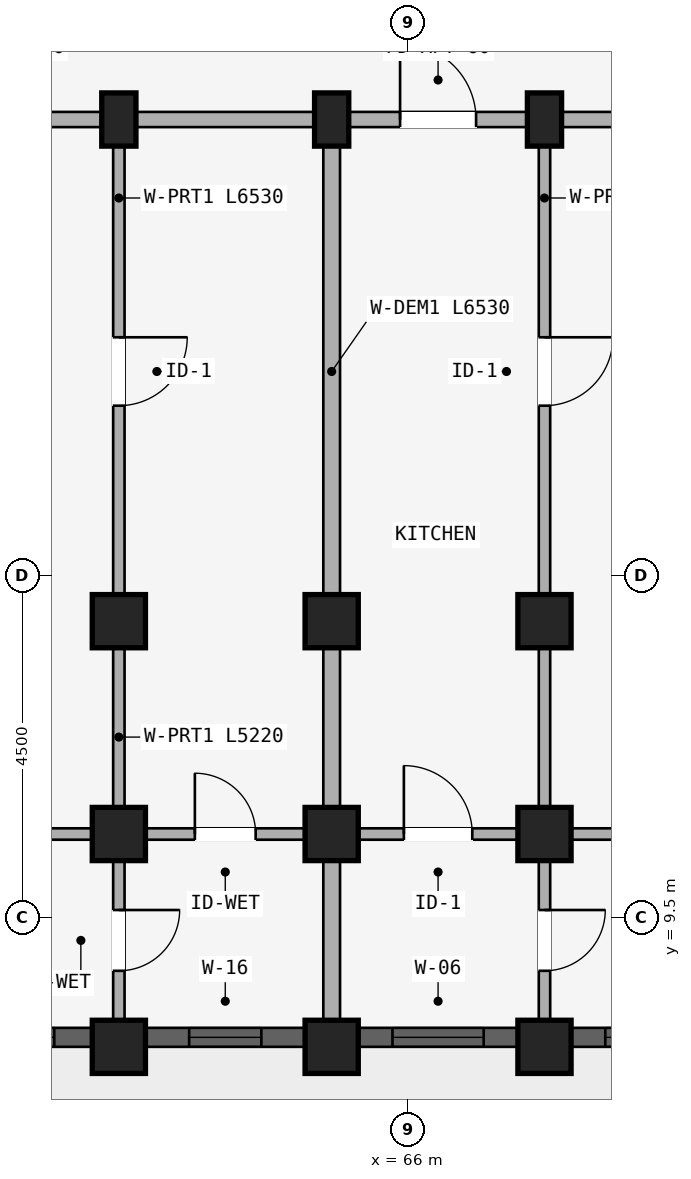
"""IFC4 building model, lengths in metres.
Left out: names, types, materials, properties, quantities, classifications, styles, units other than length and angle.
Written with IfcOpenShell. Run it as: python <this file> out.ifc"""

import sys

from ifc_helpers import new_model, si_unit, direction, frame, frame_2d, origin, origin_2d, place, context, subcontext, project, spatial, rectangle, extrude, element, fill, save


model = new_model("IFC4")
c1 = context("Model", 3, precision=1e-05, world=origin(), true_north=direction((0.0, 1.0)))
c2 = subcontext(c1, "Body", "Model", "MODEL_VIEW")
j1 = project(units=[si_unit("LENGTHUNIT", "METRE"), si_unit("PLANEANGLEUNIT", "RADIAN")], contexts=[c1])
p1 = place(None, origin())
s1 = spatial("IfcSite", under=j1, at=p1, CompositionType="ELEMENT")
p2 = place(p1, origin())
s2 = spatial("IfcBuilding", under=s1, at=p2, CompositionType="ELEMENT")
p3 = place(p2, frame((0.0, 0.0, 24.45)))
s3 = spatial("IfcBuildingStorey", under=s2, at=p3, CompositionType="ELEMENT", Elevation=24.45)
p4 = place(p3, frame((62.2, 20.0, 0.0), z_axis=(0.0, 0.0, 1.0), x_axis=(1.0, 0.0, 0.0)))
e1 = element("IfcColumn", 1, at=p4, inside=s3, PredefinedType="COLUMN", context=c2, shape_type="SweptSolid", body=[
    extrude(rectangle(XDim=0.45, YDim=0.7, at=origin_2d()), origin(), (0.0, 0.0, 1.0), 2.93),
])
for number, where, z_axis, x_axis in (
    (2, (62.2, 13.4, 0.0), (0.0, 0.0, 1.0), (1.0, 0.0, 0.0)),
    (3, (62.2, 10.6, 0.0), (0.0, 0.0, 1.0), (1.0, 0.0, 0.0)),
):
    element("IfcColumn", number, at=place(p3, frame(where, z_axis=z_axis, x_axis=x_axis)), inside=s3, PredefinedType="COLUMN", context=c2, shape_type="SweptSolid", body=[
        extrude(rectangle(XDim=0.7, YDim=0.7, at=origin_2d()), origin(), (0.0, 0.0, 1.0), 2.93),
    ])
p5 = place(p3, frame((62.2, 7.8, 0.0), z_axis=(0.0, 0.0, 1.0), x_axis=(1.0, 0.0, 0.0)))
e4 = element("IfcColumn", 4, at=p5, inside=s3, PredefinedType="COLUMN", context=c2, shape_type="SweptSolid", body=[
    extrude(rectangle(XDim=0.7, YDim=0.7, at=origin_2d()), origin(), (0.0, 0.0, 1.0), 2.97),
])
p6 = place(p3, frame((65.0, 20.0, 0.0), z_axis=(0.0, 0.0, 1.0), x_axis=(1.0, 0.0, 0.0)))
e5 = element("IfcColumn", 5, at=p6, inside=s3, PredefinedType="COLUMN", context=c2, shape_type="SweptSolid", body=[
    extrude(rectangle(XDim=0.45, YDim=0.7, at=origin_2d()), origin(), (0.0, 0.0, 1.0), 2.93),
])
for number, where, z_axis, x_axis in (
    (6, (65.0, 13.4, 0.0), (0.0, 0.0, 1.0), (1.0, 0.0, 0.0)),
    (7, (65.0, 10.6, 0.0), (0.0, 0.0, 1.0), (1.0, 0.0, 0.0)),
):
    element("IfcColumn", number, at=place(p3, frame(where, z_axis=z_axis, x_axis=x_axis)), inside=s3, PredefinedType="COLUMN", context=c2, shape_type="SweptSolid", body=[
        extrude(rectangle(XDim=0.7, YDim=0.7, at=origin_2d()), origin(), (0.0, 0.0, 1.0), 2.93),
    ])
p7 = place(p3, frame((65.0, 7.8, 0.0), z_axis=(0.0, 0.0, 1.0), x_axis=(1.0, 0.0, 0.0)))
e8 = element("IfcColumn", 8, at=p7, inside=s3, PredefinedType="COLUMN", context=c2, shape_type="SweptSolid", body=[
    extrude(rectangle(XDim=0.7, YDim=0.7, at=origin_2d()), origin(), (0.0, 0.0, 1.0), 2.97),
])
p8 = place(p3, frame((67.8, 20.0, 0.0), z_axis=(0.0, 0.0, 1.0), x_axis=(1.0, 0.0, 0.0)))
e9 = element("IfcColumn", 9, at=p8, inside=s3, PredefinedType="COLUMN", context=c2, shape_type="SweptSolid", body=[
    extrude(rectangle(XDim=0.45, YDim=0.7, at=origin_2d()), origin(), (0.0, 0.0, 1.0), 2.93),
])
for number, where, z_axis, x_axis in (
    (10, (67.8, 13.4, 0.0), (0.0, 0.0, 1.0), (1.0, 0.0, 0.0)),
    (11, (67.8, 10.6, 0.0), (0.0, 0.0, 1.0), (1.0, 0.0, 0.0)),
):
    element("IfcColumn", number, at=place(p3, frame(where, z_axis=z_axis, x_axis=x_axis)), inside=s3, PredefinedType="COLUMN", context=c2, shape_type="SweptSolid", body=[
        extrude(rectangle(XDim=0.7, YDim=0.7, at=origin_2d()), origin(), (0.0, 0.0, 1.0), 2.93),
    ])
p9 = place(p3, frame((67.8, 7.8, 0.0), z_axis=(0.0, 0.0, 1.0), x_axis=(1.0, 0.0, 0.0)))
e12 = element("IfcColumn", 12, at=p9, inside=s3, PredefinedType="COLUMN", context=c2, shape_type="SweptSolid", body=[
    extrude(rectangle(XDim=0.7, YDim=0.7, at=origin_2d()), origin(), (0.0, 0.0, 1.0), 2.97),
])
p10 = place(p3, frame((59.4, 20.0, 0.0), z_axis=(0.0, 0.0, 1.0), x_axis=(1.0, 0.0, 0.0)))
e13 = element("IfcWall", 13, at=p10, inside=s3, PredefinedType="STANDARD", context=c2, shape_type="SweptSolid", body=[
    extrude(rectangle(XDim=2.8, YDim=0.2, at=frame_2d((1.4, 0.0))), origin(), (0.0, 0.0, 1.0), 2.372),
])
p11 = place(p10, frame((0.9, 0.0, 0.0)))
e14 = element("IfcOpeningElement", 14, at=p11, cuts=e13, PredefinedType="OPENING", context=c2, shape_type="SweptSolid", body=[
    extrude(rectangle(XDim=1.0, YDim=2.15, at=frame_2d((0.5, 1.075))), frame((0.0, 0.11, 0.0), z_axis=(0.0, -1.0, 0.0), x_axis=(1.0, 0.0, 0.0)), (0.0, 0.0, 1.0), 0.22),
])
p12 = place(p3, frame((59.48, 10.6, 0.0), z_axis=(0.0, 0.0, 1.0), x_axis=(1.0, 0.0, 0.0)))
e15 = element("IfcWall", 15, at=p12, inside=s3, PredefinedType="PLUMBINGWALL", context=c2, shape_type="SweptSolid", body=[
    extrude(rectangle(XDim=2.64, YDim=0.15, at=frame_2d((1.32, 0.0))), origin(), (0.0, 0.0, 1.0), 2.372),
])
p13 = place(p12, frame((0.87, 0.0, 0.0)))
e16 = element("IfcOpeningElement", 16, at=p13, cuts=e15, PredefinedType="OPENING", context=c2, shape_type="SweptSolid", body=[
    extrude(rectangle(XDim=0.9, YDim=2.1, at=frame_2d((0.45, 1.05))), frame((0.0, 0.085, 0.0), z_axis=(0.0, -1.0, 0.0), x_axis=(1.0, 0.0, 0.0)), (0.0, 0.0, 1.0), 0.17),
])
p14 = place(p3, frame((62.2, 20.0, 0.0), z_axis=(0.0, 0.0, 1.0), x_axis=(1.0, 0.0, 0.0)))
e17 = element("IfcWall", 17, at=p14, inside=s3, PredefinedType="STANDARD", context=c2, shape_type="SweptSolid", body=[
    extrude(rectangle(XDim=2.8, YDim=0.2, at=frame_2d((1.4, 0.0))), origin(), (0.0, 0.0, 1.0), 2.372),
])
p15 = place(p3, frame((62.28, 10.6, 0.0), z_axis=(0.0, 0.0, 1.0), x_axis=(1.0, 0.0, 0.0)))
e18 = element("IfcWall", 18, at=p15, inside=s3, PredefinedType="PLUMBINGWALL", context=c2, shape_type="SweptSolid", body=[
    extrude(rectangle(XDim=2.64, YDim=0.15, at=frame_2d((1.32, 0.0))), origin(), (0.0, 0.0, 1.0), 2.372),
])
p16 = place(p15, frame((0.92, 0.0, 0.0)))
e19 = element("IfcOpeningElement", 19, at=p16, cuts=e18, PredefinedType="OPENING", context=c2, shape_type="SweptSolid", body=[
    extrude(rectangle(XDim=0.8, YDim=2.1, at=frame_2d((0.4, 1.05))), frame((0.0, 0.085, 0.0), z_axis=(0.0, -1.0, 0.0), x_axis=(1.0, 0.0, 0.0)), (0.0, 0.0, 1.0), 0.17),
])
p17 = place(p3, frame((65.0, 20.0, 0.0), z_axis=(0.0, 0.0, 1.0), x_axis=(1.0, 0.0, 0.0)))
e20 = element("IfcWall", 20, at=p17, inside=s3, PredefinedType="STANDARD", context=c2, shape_type="SweptSolid", body=[
    extrude(rectangle(XDim=2.8, YDim=0.2, at=frame_2d((1.4, 0.0))), origin(), (0.0, 0.0, 1.0), 2.372),
])
p18 = place(p17, frame((0.9, 0.0, 0.0)))
e21 = element("IfcOpeningElement", 21, at=p18, cuts=e20, PredefinedType="OPENING", context=c2, shape_type="SweptSolid", body=[
    extrude(rectangle(XDim=1.0, YDim=2.15, at=frame_2d((0.5, 1.075))), frame((0.0, 0.11, 0.0), z_axis=(0.0, -1.0, 0.0), x_axis=(1.0, 0.0, 0.0)), (0.0, 0.0, 1.0), 0.22),
])
p19 = place(p3, frame((65.08, 10.6, 0.0), z_axis=(0.0, 0.0, 1.0), x_axis=(1.0, 0.0, 0.0)))
e22 = element("IfcWall", 22, at=p19, inside=s3, PredefinedType="PLUMBINGWALL", context=c2, shape_type="SweptSolid", body=[
    extrude(rectangle(XDim=2.64, YDim=0.15, at=frame_2d((1.32, 0.0))), origin(), (0.0, 0.0, 1.0), 2.372),
])
p20 = place(p19, frame((0.87, 0.0, 0.0)))
e23 = element("IfcOpeningElement", 23, at=p20, cuts=e22, PredefinedType="OPENING", context=c2, shape_type="SweptSolid", body=[
    extrude(rectangle(XDim=0.9, YDim=2.1, at=frame_2d((0.45, 1.05))), frame((0.0, 0.085, 0.0), z_axis=(0.0, -1.0, 0.0), x_axis=(1.0, 0.0, 0.0)), (0.0, 0.0, 1.0), 0.17),
])
p21 = place(p3, frame((67.8, 20.0, 0.0), z_axis=(0.0, 0.0, 1.0), x_axis=(1.0, 0.0, 0.0)))
e24 = element("IfcWall", 24, at=p21, inside=s3, PredefinedType="STANDARD", context=c2, shape_type="SweptSolid", body=[
    extrude(rectangle(XDim=2.8, YDim=0.2, at=frame_2d((1.4, 0.0))), origin(), (0.0, 0.0, 1.0), 2.372),
])
p22 = place(p3, frame((67.88, 10.6, 0.0), z_axis=(0.0, 0.0, 1.0), x_axis=(1.0, 0.0, 0.0)))
e25 = element("IfcWall", 25, at=p22, inside=s3, PredefinedType="PLUMBINGWALL", context=c2, shape_type="SweptSolid", body=[
    extrude(rectangle(XDim=2.64, YDim=0.15, at=frame_2d((1.32, 0.0))), origin(), (0.0, 0.0, 1.0), 2.372),
])
p23 = place(p22, frame((0.92, 0.0, 0.0)))
e26 = element("IfcOpeningElement", 26, at=p23, cuts=e25, PredefinedType="OPENING", context=c2, shape_type="SweptSolid", body=[
    extrude(rectangle(XDim=0.8, YDim=2.1, at=frame_2d((0.4, 1.05))), frame((0.0, 0.085, 0.0), z_axis=(0.0, -1.0, 0.0), x_axis=(1.0, 0.0, 0.0)), (0.0, 0.0, 1.0), 0.17),
])
p24 = place(p3, frame((62.2, 19.95, 0.0), z_axis=(0.0, 0.0, 1.0), x_axis=(0.0, -1.0, 0.0)))
e27 = element("IfcWall", 27, at=p24, inside=s3, PredefinedType="PARTITIONING", context=c2, shape_type="SweptSolid", body=[
    extrude(rectangle(XDim=6.53, YDim=0.15, at=frame_2d((3.265, 0.0))), origin(), (0.0, 0.0, 1.0), 2.372),
])
p25 = place(p24, frame((2.815, 0.0, 0.0)))
e28 = element("IfcOpeningElement", 28, at=p25, cuts=e27, PredefinedType="OPENING", context=c2, shape_type="SweptSolid", body=[
    extrude(rectangle(XDim=0.9, YDim=2.1, at=frame_2d((0.45, 1.05))), frame((0.0, 0.085, 0.0), z_axis=(0.0, -1.0, 0.0), x_axis=(1.0, 0.0, 0.0)), (0.0, 0.0, 1.0), 0.17),
])
p26 = place(p3, frame((62.2, 13.3, 0.0), z_axis=(0.0, 0.0, 1.0), x_axis=(0.0, -1.0, 0.0)))
e29 = element("IfcWall", 29, at=p26, inside=s3, PredefinedType="PARTITIONING", context=c2, shape_type="SweptSolid", body=[
    extrude(rectangle(XDim=5.22, YDim=0.15, at=frame_2d((2.61, 0.0))), origin(), (0.0, 0.0, 1.0), 2.372),
])
p27 = place(p26, frame((3.7, 0.0, 0.0)))
e30 = element("IfcOpeningElement", 30, at=p27, cuts=e29, PredefinedType="OPENING", context=c2, shape_type="SweptSolid", body=[
    extrude(rectangle(XDim=0.8, YDim=2.1, at=frame_2d((0.4, 1.05))), frame((0.0, 0.085, 0.0), z_axis=(0.0, -1.0, 0.0), x_axis=(1.0, 0.0, 0.0)), (0.0, 0.0, 1.0), 0.17),
])
p28 = place(p3, frame((65.0, 19.95, 0.0), z_axis=(0.0, 0.0, 1.0), x_axis=(0.0, -1.0, 0.0)))
e31 = element("IfcWall", 31, at=p28, inside=s3, PredefinedType="STANDARD", context=c2, shape_type="SweptSolid", body=[
    extrude(rectangle(XDim=6.53, YDim=0.22, at=frame_2d((3.265, 0.0))), origin(), (0.0, 0.0, 1.0), 2.372),
])
p29 = place(p3, frame((65.0, 13.3, 0.0), z_axis=(0.0, 0.0, 1.0), x_axis=(0.0, -1.0, 0.0)))
e32 = element("IfcWall", 32, at=p29, inside=s3, PredefinedType="STANDARD", context=c2, shape_type="SweptSolid", body=[
    extrude(rectangle(XDim=5.22, YDim=0.22, at=frame_2d((2.61, 0.0))), origin(), (0.0, 0.0, 1.0), 2.372),
])
p30 = place(p3, frame((67.8, 19.95, 0.0), z_axis=(0.0, 0.0, 1.0), x_axis=(0.0, -1.0, 0.0)))
e33 = element("IfcWall", 33, at=p30, inside=s3, PredefinedType="PARTITIONING", context=c2, shape_type="SweptSolid", body=[
    extrude(rectangle(XDim=6.53, YDim=0.15, at=frame_2d((3.265, 0.0))), origin(), (0.0, 0.0, 1.0), 2.372),
])
p31 = place(p30, frame((2.815, 0.0, 0.0)))
e34 = element("IfcOpeningElement", 34, at=p31, cuts=e33, PredefinedType="OPENING", context=c2, shape_type="SweptSolid", body=[
    extrude(rectangle(XDim=0.9, YDim=2.1, at=frame_2d((0.45, 1.05))), frame((0.0, 0.085, 0.0), z_axis=(0.0, -1.0, 0.0), x_axis=(1.0, 0.0, 0.0)), (0.0, 0.0, 1.0), 0.17),
])
p32 = place(p3, frame((67.8, 13.3, 0.0), z_axis=(0.0, 0.0, 1.0), x_axis=(0.0, -1.0, 0.0)))
e35 = element("IfcWall", 35, at=p32, inside=s3, PredefinedType="PARTITIONING", context=c2, shape_type="SweptSolid", body=[
    extrude(rectangle(XDim=5.22, YDim=0.15, at=frame_2d((2.61, 0.0))), origin(), (0.0, 0.0, 1.0), 2.372),
])
p33 = place(p32, frame((3.7, 0.0, 0.0)))
e36 = element("IfcOpeningElement", 36, at=p33, cuts=e35, PredefinedType="OPENING", context=c2, shape_type="SweptSolid", body=[
    extrude(rectangle(XDim=0.8, YDim=2.1, at=frame_2d((0.4, 1.05))), frame((0.0, 0.085, 0.0), z_axis=(0.0, -1.0, 0.0), x_axis=(1.0, 0.0, 0.0)), (0.0, 0.0, 1.0), 0.17),
])
p34 = place(p3, frame((59.753, 7.925, 0.0), z_axis=(0.0, 0.0, 1.0), x_axis=(1.0, 0.0, 0.0)))
e37 = element("IfcWall", 37, at=p34, inside=s3, PredefinedType="STANDARD", context=c2, shape_type="SweptSolid", body=[
    extrude(rectangle(XDim=2.093, YDim=0.25, at=frame_2d((1.046, 0.0))), origin(), (0.0, 0.0, 1.0), 2.48),
])
p35 = place(p34, frame((0.497, 0.0, 0.83)))
e38 = element("IfcOpeningElement", 38, at=p35, cuts=e37, PredefinedType="OPENING", context=c2, shape_type="SweptSolid", body=[
    extrude(rectangle(XDim=1.1, YDim=1.45, at=frame_2d((0.55, 0.725))), frame((0.0, 0.135, 0.0), z_axis=(0.0, -1.0, 0.0), x_axis=(1.0, 0.0, 0.0)), (0.0, 0.0, 1.0), 0.27),
])
p36 = place(p3, frame((62.553, 7.925, 0.0), z_axis=(0.0, 0.0, 1.0), x_axis=(1.0, 0.0, 0.0)))
e39 = element("IfcWall", 39, at=p36, inside=s3, PredefinedType="STANDARD", context=c2, shape_type="SweptSolid", body=[
    extrude(rectangle(XDim=2.093, YDim=0.25, at=frame_2d((1.046, 0.0))), origin(), (0.0, 0.0, 1.0), 2.48),
])
p37 = place(p36, frame((0.572, 0.0, 0.88)))
e40 = element("IfcOpeningElement", 40, at=p37, cuts=e39, PredefinedType="OPENING", context=c2, shape_type="SweptSolid", body=[
    extrude(rectangle(XDim=0.95, YDim=1.35, at=frame_2d((0.475, 0.675))), frame((0.0, 0.135, 0.0), z_axis=(0.0, -1.0, 0.0), x_axis=(1.0, 0.0, 0.0)), (0.0, 0.0, 1.0), 0.27),
])
p38 = place(p3, frame((65.354, 7.925, 0.0), z_axis=(0.0, 0.0, 1.0), x_axis=(1.0, 0.0, 0.0)))
e41 = element("IfcWall", 41, at=p38, inside=s3, PredefinedType="STANDARD", context=c2, shape_type="SweptSolid", body=[
    extrude(rectangle(XDim=2.093, YDim=0.25, at=frame_2d((1.046, 0.0))), origin(), (0.0, 0.0, 1.0), 2.48),
])
p39 = place(p38, frame((0.447, 0.0, 0.78)))
e42 = element("IfcOpeningElement", 42, at=p39, cuts=e41, PredefinedType="OPENING", context=c2, shape_type="SweptSolid", body=[
    extrude(rectangle(XDim=1.2, YDim=1.5, at=frame_2d((0.6, 0.75))), frame((0.0, 0.135, 0.0), z_axis=(0.0, -1.0, 0.0), x_axis=(1.0, 0.0, 0.0)), (0.0, 0.0, 1.0), 0.27),
])
p40 = place(p3, frame((68.154, 7.925, 0.0), z_axis=(0.0, 0.0, 1.0), x_axis=(1.0, 0.0, 0.0)))
e43 = element("IfcWall", 43, at=p40, inside=s3, PredefinedType="STANDARD", context=c2, shape_type="SweptSolid", body=[
    extrude(rectangle(XDim=2.093, YDim=0.25, at=frame_2d((1.046, 0.0))), origin(), (0.0, 0.0, 1.0), 2.48),
])
p41 = place(p40, frame((0.447, 0.0, 0.78)))
e44 = element("IfcOpeningElement", 44, at=p41, cuts=e43, PredefinedType="OPENING", context=c2, shape_type="SweptSolid", body=[
    extrude(rectangle(XDim=1.2, YDim=1.5, at=frame_2d((0.6, 0.75))), frame((0.0, 0.135, 0.0), z_axis=(0.0, -1.0, 0.0), x_axis=(1.0, 0.0, 0.0)), (0.0, 0.0, 1.0), 0.27),
])
p42 = place(p35, origin())
e45 = element("IfcWindow", 45, at=p42, inside=s3, PartitioningType="SINGLE_PANEL", PredefinedType="WINDOW", context=c2, shape_type="SweptSolid", body=[
    extrude(rectangle(XDim=1.1, YDim=1.45, at=frame_2d((0.55, 0.725))), frame((0.0, 0.03, 0.0), z_axis=(0.0, -1.0, 0.0), x_axis=(1.0, 0.0, 0.0)), (0.0, 0.0, 1.0), 0.06),
])
fill(e38, e45)
p43 = place(p37, origin())
e46 = element("IfcWindow", 46, at=p43, inside=s3, PartitioningType="SINGLE_PANEL", PredefinedType="WINDOW", context=c2, shape_type="SweptSolid", body=[
    extrude(rectangle(XDim=0.95, YDim=1.35, at=frame_2d((0.475, 0.675))), frame((0.0, 0.03, 0.0), z_axis=(0.0, -1.0, 0.0), x_axis=(1.0, 0.0, 0.0)), (0.0, 0.0, 1.0), 0.06),
])
fill(e40, e46)
p44 = place(p39, origin())
e47 = element("IfcWindow", 47, at=p44, inside=s3, PartitioningType="SINGLE_PANEL", PredefinedType="WINDOW", context=c2, shape_type="SweptSolid", body=[
    extrude(rectangle(XDim=1.2, YDim=1.5, at=frame_2d((0.6, 0.75))), frame((0.0, 0.03, 0.0), z_axis=(0.0, -1.0, 0.0), x_axis=(1.0, 0.0, 0.0)), (0.0, 0.0, 1.0), 0.06),
])
fill(e42, e47)
p45 = place(p41, origin())
e48 = element("IfcWindow", 48, at=p45, inside=s3, PartitioningType="SINGLE_PANEL", PredefinedType="WINDOW", context=c2, shape_type="SweptSolid", body=[
    extrude(rectangle(XDim=1.2, YDim=1.5, at=frame_2d((0.6, 0.75))), frame((0.0, 0.03, 0.0), z_axis=(0.0, -1.0, 0.0), x_axis=(1.0, 0.0, 0.0)), (0.0, 0.0, 1.0), 0.06),
])
fill(e44, e48)
p46 = place(p16, origin())
e49 = element("IfcDoor", 49, at=p46, inside=s3, OperationType="SINGLE_SWING_LEFT", PredefinedType="DOOR", context=c2, shape_type="SweptSolid", body=[
    extrude(rectangle(XDim=0.8, YDim=2.1, at=frame_2d((0.4, 1.05))), frame((0.0, 0.025, 0.0), z_axis=(0.0, -1.0, 0.0), x_axis=(1.0, 0.0, 0.0)), (0.0, 0.0, 1.0), 0.05),
])
fill(e19, e49)
p47 = place(p20, origin())
e50 = element("IfcDoor", 50, at=p47, inside=s3, OperationType="SINGLE_SWING_LEFT", PredefinedType="DOOR", context=c2, shape_type="SweptSolid", body=[
    extrude(rectangle(XDim=0.9, YDim=2.1, at=frame_2d((0.45, 1.05))), frame((0.0, 0.025, 0.0), z_axis=(0.0, -1.0, 0.0), x_axis=(1.0, 0.0, 0.0)), (0.0, 0.0, 1.0), 0.05),
])
fill(e23, e50)
p48 = place(p18, frame((1.0, 0.0, 0.0), z_axis=(0.0, 0.0, 1.0), x_axis=(-1.0, 0.0, 0.0)))
e51 = element("IfcDoor", 51, at=p48, inside=s3, OperationType="SINGLE_SWING_RIGHT", PredefinedType="DOOR", context=c2, shape_type="SweptSolid", body=[
    extrude(rectangle(XDim=1.0, YDim=2.15, at=frame_2d((0.5, 1.075))), frame((0.0, 0.025, 0.0), z_axis=(0.0, -1.0, 0.0), x_axis=(1.0, 0.0, 0.0)), (0.0, 0.0, 1.0), 0.05),
])
fill(e21, e51)
p49 = place(p25, frame((0.9, 0.0, 0.0), z_axis=(0.0, 0.0, 1.0), x_axis=(-1.0, 0.0, 0.0)))
e52 = element("IfcDoor", 52, at=p49, inside=s3, OperationType="SINGLE_SWING_RIGHT", PredefinedType="DOOR", context=c2, shape_type="SweptSolid", body=[
    extrude(rectangle(XDim=0.9, YDim=2.1, at=frame_2d((0.45, 1.05))), frame((0.0, 0.025, 0.0), z_axis=(0.0, -1.0, 0.0), x_axis=(1.0, 0.0, 0.0)), (0.0, 0.0, 1.0), 0.05),
])
fill(e28, e52)
p50 = place(p27, origin())
e53 = element("IfcDoor", 53, at=p50, inside=s3, OperationType="SINGLE_SWING_LEFT", PredefinedType="DOOR", context=c2, shape_type="SweptSolid", body=[
    extrude(rectangle(XDim=0.8, YDim=2.1, at=frame_2d((0.4, 1.05))), frame((0.0, 0.025, 0.0), z_axis=(0.0, -1.0, 0.0), x_axis=(1.0, 0.0, 0.0)), (0.0, 0.0, 1.0), 0.05),
])
fill(e30, e53)
p51 = place(p31, origin())
e54 = element("IfcDoor", 54, at=p51, inside=s3, OperationType="SINGLE_SWING_LEFT", PredefinedType="DOOR", context=c2, shape_type="SweptSolid", body=[
    extrude(rectangle(XDim=0.9, YDim=2.1, at=frame_2d((0.45, 1.05))), frame((0.0, 0.025, 0.0), z_axis=(0.0, -1.0, 0.0), x_axis=(1.0, 0.0, 0.0)), (0.0, 0.0, 1.0), 0.05),
])
fill(e34, e54)
p52 = place(p33, frame((0.8, 0.0, 0.0), z_axis=(0.0, 0.0, 1.0), x_axis=(-1.0, 0.0, 0.0)))
e55 = element("IfcDoor", 55, at=p52, inside=s3, OperationType="SINGLE_SWING_RIGHT", PredefinedType="DOOR", context=c2, shape_type="SweptSolid", body=[
    extrude(rectangle(XDim=0.8, YDim=2.1, at=frame_2d((0.4, 1.05))), frame((0.0, 0.025, 0.0), z_axis=(0.0, -1.0, 0.0), x_axis=(1.0, 0.0, 0.0)), (0.0, 0.0, 1.0), 0.05),
])
fill(e36, e55)
save(model, sys.argv[1])
